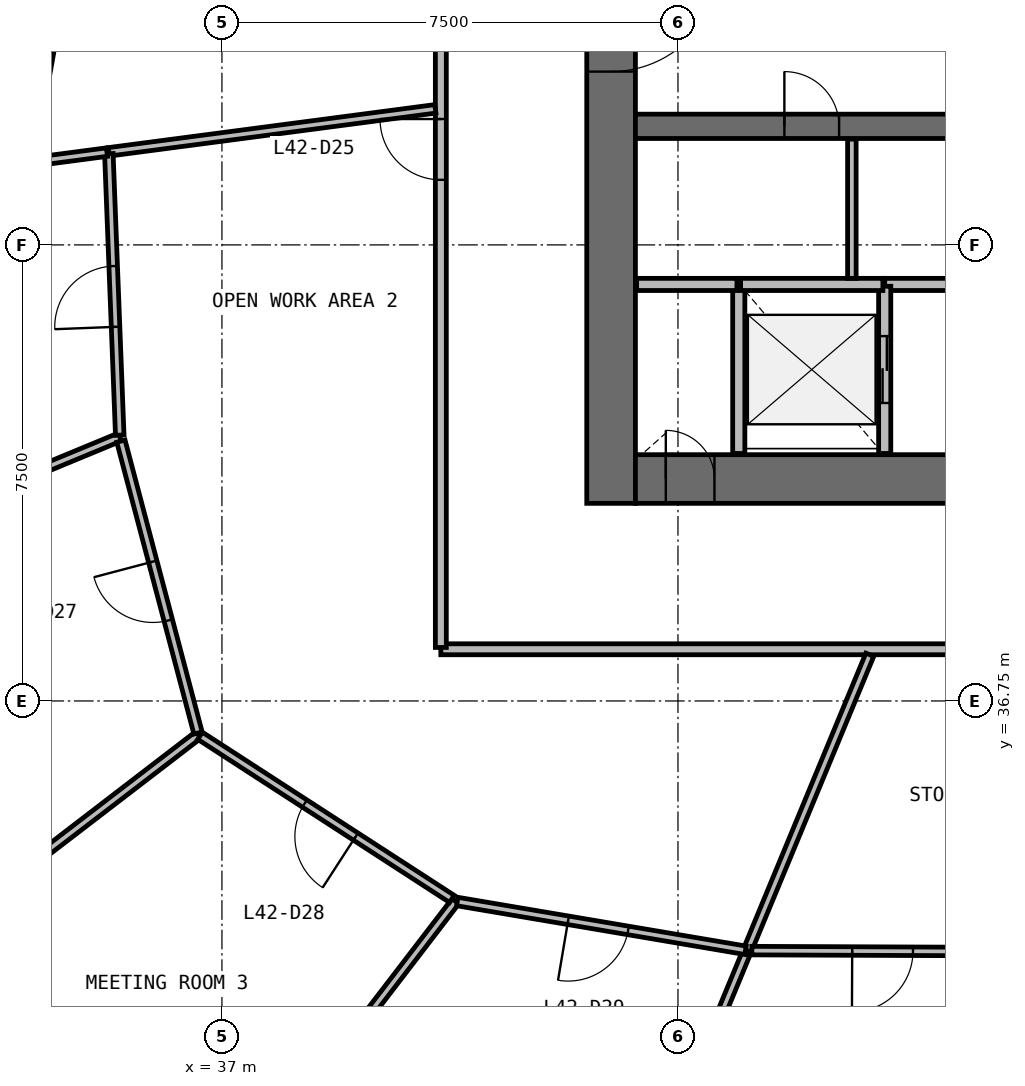
"""IFC4 building model, lengths in metres.
Left out: names, types, materials, properties, quantities, classifications, styles, units other than length and angle.
Written with IfcOpenShell. Run it as: python <this file> out.ifc"""

import sys

from ifc_helpers import new_model, si_unit, direction, frame, frame_2d, origin, place, context, subcontext, project, spatial, rectangle, extrude, source, transform, mapped, element, fill, save


model = new_model("IFC4")
c1 = context("Model", 3, precision=1e-05, world=origin(), true_north=direction((0.0, 1.0)))
c2 = subcontext(c1, "Body", "Model", "MODEL_VIEW")
j1 = project(units=[si_unit("LENGTHUNIT", "METRE"), si_unit("PLANEANGLEUNIT", "RADIAN")], contexts=[c1])
p1 = place(None, origin())
s1 = spatial("IfcSite", under=j1, at=p1, CompositionType="ELEMENT")
p2 = place(p1, origin())
s2 = spatial("IfcBuilding", under=s1, at=p2, CompositionType="ELEMENT")
p3 = place(p2, frame((0.0, 0.0, 176.0)))
s3 = spatial("IfcBuildingStorey", under=s2, at=p3, CompositionType="ELEMENT", Elevation=176.0)
p4 = place(p3, frame((43.4, 56.0, 0.0), z_axis=(0.0, 0.0, 1.0), x_axis=(0.0, -1.0, 0.0)))
e1 = element("IfcWall", 1, at=p4, inside=s3, PredefinedType="SHEAR", context=c2, shape_type="SweptSolid", body=[
    extrude(rectangle(XDim=16.0, YDim=0.8, at=frame_2d((8.0, 0.0))), origin(), (0.0, 0.0, 1.0), 3.9),
])
p5 = place(p4, frame((7.1, 0.0, 0.0)))
e2 = element("IfcOpeningElement", 2, at=p5, cuts=e1, PredefinedType="OPENING", context=c2, shape_type="SweptSolid", body=[
    extrude(rectangle(XDim=1.8, YDim=2.1, at=frame_2d((0.9, 1.05))), frame((0.0, 0.41, 0.0), z_axis=(0.0, -1.0, 0.0), x_axis=(1.0, 0.0, 0.0)), (0.0, 0.0, 1.0), 0.82),
])
p6 = place(p3, frame((43.8, 40.4, 0.0), z_axis=(0.0, 0.0, 1.0), x_axis=(1.0, 0.0, 0.0)))
e3 = element("IfcWall", 3, at=p6, inside=s3, PredefinedType="SHEAR", context=c2, shape_type="SweptSolid", body=[
    extrude(rectangle(XDim=16.4, YDim=0.8, at=frame_2d((8.2, 0.0))), origin(), (0.0, 0.0, 1.0), 3.9),
])
p7 = place(p6, frame((10.1, 0.0, 0.0)))
e4 = element("IfcOpeningElement", 4, at=p7, cuts=e3, PredefinedType="OPENING", context=c2, shape_type="SweptSolid", body=[
    extrude(rectangle(XDim=1.2, YDim=2.1, at=frame_2d((0.6, 1.05))), frame((0.0, 0.41, 0.0), z_axis=(0.0, -1.0, 0.0), x_axis=(1.0, 0.0, 0.0)), (0.0, 0.0, 1.0), 0.82),
])
p8 = place(p6, frame((7.05, 0.0, 0.0)))
e5 = element("IfcOpeningElement", 5, at=p8, cuts=e3, PredefinedType="OPENING", context=c2, shape_type="SweptSolid", body=[
    extrude(rectangle(XDim=1.1, YDim=2.1, at=frame_2d((0.55, 1.05))), frame((0.0, 0.41, 0.0), z_axis=(0.0, -1.0, 0.0), x_axis=(1.0, 0.0, 0.0)), (0.0, 0.0, 1.0), 0.82),
])
p9 = place(p6, frame((0.5, 0.0, 0.0)))
e6 = element("IfcOpeningElement", 6, at=p9, cuts=e3, PredefinedType="OPENING", context=c2, shape_type="SweptSolid", body=[
    extrude(rectangle(XDim=0.8, YDim=2.1, at=frame_2d((0.4, 1.05))), frame((0.0, 0.41, 0.0), z_axis=(0.0, -1.0, 0.0), x_axis=(1.0, 0.0, 0.0)), (0.0, 0.0, 1.0), 0.82),
])
p10 = place(p3, frame((43.8, 46.2, 0.0), z_axis=(0.0, 0.0, 1.0), x_axis=(1.0, 0.0, 0.0)))
e7 = element("IfcWall", 7, at=p10, inside=s3, PredefinedType="SHEAR", context=c2, shape_type="SweptSolid", body=[
    extrude(rectangle(XDim=16.4, YDim=0.4, at=frame_2d((8.2, 0.0))), origin(), (0.0, 0.0, 1.0), 3.9),
])
p11 = place(p10, frame((9.6, 0.0, 0.0)))
e8 = element("IfcOpeningElement", 8, at=p11, cuts=e7, PredefinedType="OPENING", context=c2, shape_type="SweptSolid", body=[
    extrude(rectangle(XDim=1.1, YDim=2.1, at=frame_2d((0.55, 1.05))), frame((0.0, 0.21, 0.0), z_axis=(0.0, -1.0, 0.0), x_axis=(1.0, 0.0, 0.0)), (0.0, 0.0, 1.0), 0.42),
])
p12 = place(p10, frame((12.1, 0.0, 0.0)))
e9 = element("IfcOpeningElement", 9, at=p12, cuts=e7, PredefinedType="OPENING", context=c2, shape_type="SweptSolid", body=[
    extrude(rectangle(XDim=1.1, YDim=2.1, at=frame_2d((0.55, 1.05))), frame((0.0, 0.21, 0.0), z_axis=(0.0, -1.0, 0.0), x_axis=(1.0, 0.0, 0.0)), (0.0, 0.0, 1.0), 0.42),
])
p13 = place(p10, frame((14.6, 0.0, 0.0)))
e10 = element("IfcOpeningElement", 10, at=p13, cuts=e7, PredefinedType="OPENING", context=c2, shape_type="SweptSolid", body=[
    extrude(rectangle(XDim=1.1, YDim=2.1, at=frame_2d((0.55, 1.05))), frame((0.0, 0.21, 0.0), z_axis=(0.0, -1.0, 0.0), x_axis=(1.0, 0.0, 0.0)), (0.0, 0.0, 1.0), 0.42),
])
p14 = place(p10, frame((2.45, 0.0, 0.0)))
e11 = element("IfcOpeningElement", 11, at=p14, cuts=e7, PredefinedType="OPENING", context=c2, shape_type="SweptSolid", body=[
    extrude(rectangle(XDim=0.9, YDim=2.1, at=frame_2d((0.45, 1.05))), frame((0.0, 0.21, 0.0), z_axis=(0.0, -1.0, 0.0), x_axis=(1.0, 0.0, 0.0)), (0.0, 0.0, 1.0), 0.42),
])
p15 = place(p10, frame((7.65, 0.0, 0.0)))
e12 = element("IfcOpeningElement", 12, at=p15, cuts=e7, PredefinedType="OPENING", context=c2, shape_type="SweptSolid", body=[
    extrude(rectangle(XDim=0.9, YDim=2.1, at=frame_2d((0.45, 1.05))), frame((0.0, 0.21, 0.0), z_axis=(0.0, -1.0, 0.0), x_axis=(1.0, 0.0, 0.0)), (0.0, 0.0, 1.0), 0.42),
])
p16 = place(p3, frame((52.7, 43.6, 0.0), z_axis=(0.0, 0.0, 1.0), x_axis=(-1.0, 0.0, 0.0)))
e13 = element("IfcWall", 13, at=p16, inside=s3, PredefinedType="SOLIDWALL", context=c2, shape_type="SweptSolid", body=[
    extrude(rectangle(XDim=4.8, YDim=0.2, at=frame_2d((2.4, 0.0))), origin(), (0.0, 0.0, 1.0), 3.4),
])
p17 = place(p3, frame((45.5, 43.6, 0.0), z_axis=(0.0, 0.0, 1.0), x_axis=(0.0, -1.0, 0.0)))
e14 = element("IfcWall", 14, at=p17, inside=s3, PredefinedType="SOLIDWALL", context=c2, shape_type="SweptSolid", body=[
    extrude(rectangle(XDim=2.78, YDim=0.2, at=frame_2d((1.39, 0.0))), origin(), (0.0, 0.0, 1.0), 3.4),
])
p18 = place(p3, frame((47.9, 40.82, 0.0), z_axis=(0.0, 0.0, 1.0), x_axis=(0.0, 1.0, 0.0)))
e15 = element("IfcWall", 15, at=p18, inside=s3, PredefinedType="SOLIDWALL", context=c2, shape_type="SweptSolid", body=[
    extrude(rectangle(XDim=2.75, YDim=0.2, at=frame_2d((1.375, 0.0))), origin(), (0.0, 0.0, 1.0), 3.4),
])
p19 = place(p18, frame((0.83, 0.0, 0.0)))
e16 = element("IfcOpeningElement", 16, at=p19, cuts=e15, PredefinedType="OPENING", context=c2, shape_type="SweptSolid", body=[
    extrude(rectangle(XDim=1.1, YDim=2.1, at=frame_2d((0.55, 1.05))), frame((0.0, 0.11, 0.0), z_axis=(0.0, -1.0, 0.0), x_axis=(1.0, 0.0, 0.0)), (0.0, 0.0, 1.0), 0.22),
])
p20 = place(p3, frame((47.87, 43.6, 0.0), z_axis=(0.0, 0.0, 1.0), x_axis=(-1.0, 0.0, 0.0)))
e17 = element("IfcWall", 17, at=p20, inside=s3, PredefinedType="SOLIDWALL", context=c2, shape_type="SweptSolid", body=[
    extrude(rectangle(XDim=2.34, YDim=0.2, at=frame_2d((1.17, 0.0))), origin(), (0.0, 0.0, 1.0), 3.4),
])
p21 = place(p3, frame((45.47, 43.6, 0.0), z_axis=(0.0, 0.0, 1.0), x_axis=(-1.0, 0.0, 0.0)))
e18 = element("IfcWall", 18, at=p21, inside=s3, PredefinedType="SOLIDWALL", context=c2, shape_type="SweptSolid", body=[
    extrude(rectangle(XDim=1.65, YDim=0.2, at=frame_2d((0.825, 0.0))), origin(), (0.0, 0.0, 1.0), 3.4),
])
p22 = place(p3, frame((63.4, 37.6, 0.0), z_axis=(0.0, 0.0, 1.0), x_axis=(-1.0, 0.0, 0.0)))
e19 = element("IfcWall", 19, at=p22, inside=s3, PredefinedType="PARTITIONING", context=c2, shape_type="SweptSolid", body=[
    extrude(rectangle(XDim=22.8, YDim=0.18, at=frame_2d((11.4, 0.0))), origin(), (0.0, 0.0, 1.0), 2.7),
])
p23 = place(p22, frame((10.95, 0.0, 0.0)))
e20 = element("IfcOpeningElement", 20, at=p23, cuts=e19, PredefinedType="OPENING", context=c2, shape_type="SweptSolid", body=[
    extrude(rectangle(XDim=1.0, YDim=2.1, at=frame_2d((0.5, 1.05))), frame((0.0, 0.1, 0.0), z_axis=(0.0, -1.0, 0.0), x_axis=(1.0, 0.0, 0.0)), (0.0, 0.0, 1.0), 0.2),
])
p24 = place(p3, frame((40.6, 37.63, 0.0), z_axis=(0.0, 0.0, 1.0), x_axis=(0.0, 1.0, 0.0)))
e21 = element("IfcWall", 21, at=p24, inside=s3, PredefinedType="PARTITIONING", context=c2, shape_type="SweptSolid", body=[
    extrude(rectangle(XDim=20.74, YDim=0.18, at=frame_2d((10.37, 0.0))), origin(), (0.0, 0.0, 1.0), 2.7),
])
p25 = place(p24, frame((15.39, 0.0, 0.0)))
e22 = element("IfcOpeningElement", 22, at=p25, cuts=e21, PredefinedType="OPENING", context=c2, shape_type="SweptSolid", body=[
    extrude(rectangle(XDim=0.9, YDim=2.1, at=frame_2d((0.45, 1.05))), frame((0.0, 0.1, 0.0), z_axis=(0.0, -1.0, 0.0), x_axis=(1.0, 0.0, 0.0)), (0.0, 0.0, 1.0), 0.2),
])
p26 = place(p24, frame((9.89, 0.0, 0.0)))
e23 = element("IfcOpeningElement", 23, at=p26, cuts=e21, PredefinedType="OPENING", context=c2, shape_type="SweptSolid", body=[
    extrude(rectangle(XDim=1.0, YDim=2.1, at=frame_2d((0.5, 1.05))), frame((0.0, 0.1, 0.0), z_axis=(0.0, -1.0, 0.0), x_axis=(1.0, 0.0, 0.0)), (0.0, 0.0, 1.0), 0.2),
])
p27 = place(p24, frame((7.69, 0.0, 0.0)))
e24 = element("IfcOpeningElement", 24, at=p27, cuts=e21, PredefinedType="OPENING", context=c2, shape_type="SweptSolid", body=[
    extrude(rectangle(XDim=1.0, YDim=2.1, at=frame_2d((0.5, 1.05))), frame((0.0, 0.1, 0.0), z_axis=(0.0, -1.0, 0.0), x_axis=(1.0, 0.0, 0.0)), (0.0, 0.0, 1.0), 0.2),
])
p28 = place(p3, frame((35.321, 41.091, 0.0), z_axis=(0.0, 0.0, 1.0), x_axis=(-0.923886990837, -0.382665425879, 0.0)))
e25 = element("IfcWall", 25, at=p28, inside=s3, PredefinedType="PARTITIONING", context=c2, shape_type="SweptSolid", body=[
    extrude(rectangle(XDim=5.683, YDim=0.14, at=frame_2d((2.842, 0.0))), origin(), (0.0, 0.0, 1.0), 2.7),
])
p29 = place(p3, frame((40.51, 46.487, 0.0), z_axis=(0.0, 0.0, 1.0), x_axis=(-0.991447698831, -0.130504637781, 0.0)))
e26 = element("IfcWall", 26, at=p29, inside=s3, PredefinedType="PARTITIONING", context=c2, shape_type="SweptSolid", body=[
    extrude(rectangle(XDim=5.418, YDim=0.14, at=frame_2d((2.709, 0.0))), origin(), (0.0, 0.0, 1.0), 2.7),
])
p30 = place(p3, frame((47.655, 37.51, 0.0), z_axis=(0.0, 0.0, 1.0), x_axis=(-0.382665709235, -0.923886873473, 0.0)))
e27 = element("IfcWall", 27, at=p30, inside=s3, PredefinedType="PARTITIONING", context=c2, shape_type="SweptSolid", body=[
    extrude(rectangle(XDim=5.266, YDim=0.14, at=frame_2d((2.633, 0.0))), origin(), (0.0, 0.0, 1.0), 2.7),
])
p31 = place(p3, frame((45.628, 32.617, 0.0), z_axis=(0.0, 0.0, 1.0), x_axis=(-0.382675537461, -0.923882802648, 0.0)))
e28 = element("IfcWall", 28, at=p31, inside=s3, PredefinedType="PARTITIONING", context=c2, shape_type="SweptSolid", body=[
    extrude(rectangle(XDim=5.284, YDim=0.14, at=frame_2d((2.642, 0.0))), origin(), (0.0, 0.0, 1.0), 2.7),
])
p32 = place(p3, frame((40.841, 33.457, 0.0), z_axis=(0.0, 0.0, 1.0), x_axis=(-0.608780216018, -0.793338924159, 0.0)))
e29 = element("IfcWall", 29, at=p32, inside=s3, PredefinedType="PARTITIONING", context=c2, shape_type="SweptSolid", body=[
    extrude(rectangle(XDim=5.188, YDim=0.14, at=frame_2d((2.594, 0.0))), origin(), (0.0, 0.0, 1.0), 2.7),
])
p33 = place(p3, frame((36.614, 36.194, 0.0), z_axis=(0.0, 0.0, 1.0), x_axis=(-0.79337017358, -0.608739490811, 0.0)))
e30 = element("IfcWall", 30, at=p33, inside=s3, PredefinedType="PARTITIONING", context=c2, shape_type="SweptSolid", body=[
    extrude(rectangle(XDim=5.092, YDim=0.14, at=frame_2d((2.546, 0.0))), origin(), (0.0, 0.0, 1.0), 2.7),
])
p34 = place(p3, frame((36.607, 36.223, 0.0), z_axis=(0.0, 0.0, 1.0), x_axis=(-0.255485666684, 0.966812843377, 0.0)))
e31 = element("IfcWall", 31, at=p34, inside=s3, PredefinedType="PARTITIONING", context=c2, shape_type="SweptSolid", body=[
    extrude(rectangle(XDim=4.964, YDim=0.14, at=frame_2d((2.482, 0.0))), origin(), (0.0, 0.0, 1.0), 2.7),
])
p35 = place(p34, frame((1.914, 0.0, 0.0)))
e32 = element("IfcOpeningElement", 32, at=p35, cuts=e31, PredefinedType="OPENING", context=c2, shape_type="SweptSolid", body=[
    extrude(rectangle(XDim=1.0, YDim=2.1, at=frame_2d((0.5, 1.05))), frame((0.0, 0.08, 0.0), z_axis=(0.0, -1.0, 0.0), x_axis=(1.0, 0.0, 0.0)), (0.0, 0.0, 1.0), 0.16),
])
p36 = place(p3, frame((40.782, 33.495, 0.0), z_axis=(0.0, 0.0, 1.0), x_axis=(-0.839336490457, 0.543612229247, 0.0)))
e33 = element("IfcWall", 33, at=p36, inside=s3, PredefinedType="PARTITIONING", context=c2, shape_type="SweptSolid", body=[
    extrude(rectangle(XDim=4.935, YDim=0.14, at=frame_2d((2.468, 0.0))), origin(), (0.0, 0.0, 1.0), 2.7),
])
p37 = place(p36, frame((1.885, 0.0, 0.0)))
e34 = element("IfcOpeningElement", 34, at=p37, cuts=e33, PredefinedType="OPENING", context=c2, shape_type="SweptSolid", body=[
    extrude(rectangle(XDim=1.0, YDim=2.1, at=frame_2d((0.5, 1.05))), frame((0.0, 0.08, 0.0), z_axis=(0.0, -1.0, 0.0), x_axis=(1.0, 0.0, 0.0)), (0.0, 0.0, 1.0), 0.16),
])
p38 = place(p3, frame((45.61, 32.65, 0.0), z_axis=(0.0, 0.0, 1.0), x_axis=(-0.985986026567, 0.166827921569, 0.0)))
e35 = element("IfcWall", 35, at=p38, inside=s3, PredefinedType="PARTITIONING", context=c2, shape_type="SweptSolid", body=[
    extrude(rectangle(XDim=4.807, YDim=0.14, at=frame_2d((2.404, 0.0))), origin(), (0.0, 0.0, 1.0), 2.7),
])
p39 = place(p38, frame((1.957, 0.0, 0.0)))
e36 = element("IfcOpeningElement", 36, at=p39, cuts=e35, PredefinedType="OPENING", context=c2, shape_type="SweptSolid", body=[
    extrude(rectangle(XDim=1.0, YDim=2.1, at=frame_2d((0.5, 1.05))), frame((0.0, 0.08, 0.0), z_axis=(0.0, -1.0, 0.0), x_axis=(1.0, 0.0, 0.0)), (0.0, 0.0, 1.0), 0.16),
])
p40 = place(p3, frame((33.838, 45.609, 0.0), z_axis=(0.0, 0.0, 1.0), x_axis=(0.177038409818, 0.984203943016, 0.0)))
e37 = element("IfcWall", 37, at=p40, inside=s3, PredefinedType="PARTITIONING", context=c2, shape_type="SweptSolid", body=[
    extrude(rectangle(XDim=4.747, YDim=0.14, at=frame_2d((2.373, 0.0))), origin(), (0.0, 0.0, 1.0), 2.7),
])
p41 = place(p40, frame((1.896, 0.0, 0.0)))
e38 = element("IfcOpeningElement", 38, at=p41, cuts=e37, PredefinedType="OPENING", context=c2, shape_type="SweptSolid", body=[
    extrude(rectangle(XDim=1.0, YDim=2.1, at=frame_2d((0.5, 1.05))), frame((0.0, 0.08, 0.0), z_axis=(0.0, -1.0, 0.0), x_axis=(1.0, 0.0, 0.0)), (0.0, 0.0, 1.0), 0.16),
])
p42 = place(p3, frame((35.319, 41.121, 0.0), z_axis=(0.0, 0.0, 1.0), x_axis=(-0.038734687245, 0.9992495304, 0.0)))
e39 = element("IfcWall", 39, at=p42, inside=s3, PredefinedType="PARTITIONING", context=c2, shape_type="SweptSolid", body=[
    extrude(rectangle(XDim=4.633, YDim=0.14, at=frame_2d((2.316, 0.0))), origin(), (0.0, 0.0, 1.0), 2.7),
])
p43 = place(p42, frame((1.783, 0.0, 0.0)))
e40 = element("IfcOpeningElement", 40, at=p43, cuts=e39, PredefinedType="OPENING", context=c2, shape_type="SweptSolid", body=[
    extrude(rectangle(XDim=1.0, YDim=2.1, at=frame_2d((0.5, 1.05))), frame((0.0, 0.08, 0.0), z_axis=(0.0, -1.0, 0.0), x_axis=(1.0, 0.0, 0.0)), (0.0, 0.0, 1.0), 0.16),
])
p44 = place(p3, frame((49.906, 32.628, 0.0), z_axis=(0.0, 0.0, 1.0), x_axis=(-0.999991918788, 0.004020243687, 0.0)))
e41 = element("IfcWall", 41, at=p44, inside=s3, PredefinedType="PARTITIONING", context=c2, shape_type="SweptSolid", body=[
    extrude(rectangle(XDim=4.19, YDim=0.14, at=frame_2d((2.095, 0.0))), origin(), (0.0, 0.0, 1.0), 2.7),
])
p45 = place(p44, frame((1.54, 0.0, 0.0)))
e42 = element("IfcOpeningElement", 42, at=p45, cuts=e41, PredefinedType="OPENING", context=c2, shape_type="SweptSolid", body=[
    extrude(rectangle(XDim=1.0, YDim=2.1, at=frame_2d((0.5, 1.05))), frame((0.0, 0.08, 0.0), z_axis=(0.0, -1.0, 0.0), x_axis=(1.0, 0.0, 0.0)), (0.0, 0.0, 1.0), 0.16),
])
p46 = place(p3, frame((47.36, 43.7, 0.0), z_axis=(0.0, 0.0, 1.0), x_axis=(0.0, 1.0, 0.0)))
e43 = element("IfcWall", 43, at=p46, inside=s3, PredefinedType="PARTITIONING", context=c2, shape_type="SweptSolid", body=[
    extrude(rectangle(XDim=2.29, YDim=0.14, at=frame_2d((1.145, 0.0))), origin(), (0.0, 0.0, 1.0), 2.7),
])
p47 = place(p3, frame((35.109, 45.776, 0.0), z_axis=(0.0, 0.0, 1.0), x_axis=(-0.991468047208, -0.130349957287, 0.0)))
e44 = element("IfcWall", 44, at=p47, inside=s3, PredefinedType="PARTITIONING", context=c2, shape_type="SweptSolid", body=[
    extrude(rectangle(XDim=1.208, YDim=0.14, at=frame_2d((0.604, 0.0))), origin(), (0.0, 0.0, 1.0), 2.7),
])
m1 = source(origin(), c2, "Body", "SweptSolid", [
    extrude(rectangle(XDim=1.8, YDim=2.1, at=frame_2d((0.9, 1.05))), frame((0.0, 0.025, 0.0), z_axis=(0.0, -1.0, 0.0), x_axis=(1.0, 0.0, 0.0)), (0.0, 0.0, 1.0), 0.05),
])
p48 = place(p5, origin())
e45 = element("IfcDoor", 45, at=p48, inside=s3, OperationType="SINGLE_SWING_LEFT", PredefinedType="DOOR", context=c2, shape_type="MappedRepresentation", body=[
    mapped(m1, transform((0.0, 0.0, 0.0), scale=1.0)),
])
fill(e2, e45)
m2 = source(origin(), c2, "Body", "SweptSolid", [
    extrude(rectangle(XDim=1.1, YDim=2.1, at=frame_2d((0.55, 1.05))), frame((0.0, 0.025, 0.0), z_axis=(0.0, -1.0, 0.0), x_axis=(1.0, 0.0, 0.0)), (0.0, 0.0, 1.0), 0.05),
])
p49 = place(p19, origin())
e46 = element("IfcDoor", 46, at=p49, inside=s3, OperationType="DOUBLE_DOOR_SLIDING", PredefinedType="USERDEFINED", context=c2, shape_type="MappedRepresentation", body=[
    mapped(m2, transform((0.0, 0.0, 0.0), scale=1.0)),
])
fill(e16, e46)
m3 = source(origin(), c2, "Body", "SweptSolid", [
    extrude(rectangle(XDim=0.8, YDim=2.1, at=frame_2d((0.4, 1.05))), frame((0.0, 0.025, 0.0), z_axis=(0.0, -1.0, 0.0), x_axis=(1.0, 0.0, 0.0)), (0.0, 0.0, 1.0), 0.05),
])
p50 = place(p9, origin())
e47 = element("IfcDoor", 47, at=p50, inside=s3, OperationType="SINGLE_SWING_LEFT", PredefinedType="DOOR", context=c2, shape_type="MappedRepresentation", body=[
    mapped(m3, transform((0.0, 0.0, 0.0), scale=1.0)),
])
fill(e6, e47)
m4 = source(origin(), c2, "Body", "SweptSolid", [
    extrude(rectangle(XDim=1.0, YDim=2.1, at=frame_2d((0.5, 1.05))), frame((0.0, 0.025, 0.0), z_axis=(0.0, -1.0, 0.0), x_axis=(1.0, 0.0, 0.0)), (0.0, 0.0, 1.0), 0.05),
])
p51 = place(p27, origin())
e48 = element("IfcDoor", 48, at=p51, inside=s3, OperationType="SINGLE_SWING_RIGHT", PredefinedType="DOOR", context=c2, shape_type="MappedRepresentation", body=[
    mapped(m4, transform((0.0, 0.0, 0.0), scale=1.0)),
])
fill(e24, e48)
p52 = place(p43, origin())
e49 = element("IfcDoor", 49, at=p52, inside=s3, OperationType="SINGLE_SWING_LEFT", PredefinedType="DOOR", context=c2, shape_type="MappedRepresentation", body=[
    mapped(m4, transform((0.0, 0.0, 0.0), scale=1.0)),
])
fill(e40, e49)
p53 = place(p35, origin())
e50 = element("IfcDoor", 50, at=p53, inside=s3, OperationType="SINGLE_SWING_RIGHT", PredefinedType="DOOR", context=c2, shape_type="MappedRepresentation", body=[
    mapped(m4, transform((0.0, 0.0, 0.0), scale=1.0)),
])
fill(e32, e50)
p54 = place(p37, origin())
e51 = element("IfcDoor", 51, at=p54, inside=s3, OperationType="SINGLE_SWING_LEFT", PredefinedType="DOOR", context=c2, shape_type="MappedRepresentation", body=[
    mapped(m4, transform((0.0, 0.0, 0.0), scale=1.0)),
])
fill(e34, e51)
p55 = place(p39, origin())
e52 = element("IfcDoor", 52, at=p55, inside=s3, OperationType="SINGLE_SWING_RIGHT", PredefinedType="DOOR", context=c2, shape_type="MappedRepresentation", body=[
    mapped(m4, transform((0.0, 0.0, 0.0), scale=1.0)),
])
fill(e36, e52)
p56 = place(p45, origin())
e53 = element("IfcDoor", 53, at=p56, inside=s3, OperationType="SINGLE_SWING_RIGHT", PredefinedType="DOOR", context=c2, shape_type="MappedRepresentation", body=[
    mapped(m4, transform((0.0, 0.0, 0.0), scale=1.0)),
])
fill(e42, e53)
m5 = source(origin(), c2, "Body", "SweptSolid", [
    extrude(rectangle(XDim=0.9, YDim=2.1, at=frame_2d((0.45, 1.05))), frame((0.0, 0.025, 0.0), z_axis=(0.0, -1.0, 0.0), x_axis=(1.0, 0.0, 0.0)), (0.0, 0.0, 1.0), 0.05),
])
p57 = place(p14, origin())
e54 = element("IfcDoor", 54, at=p57, inside=s3, OperationType="SINGLE_SWING_LEFT", PredefinedType="DOOR", context=c2, shape_type="MappedRepresentation", body=[
    mapped(m5, transform((0.0, 0.0, 0.0), scale=1.0)),
])
fill(e11, e54)
save(model, sys.argv[1])
